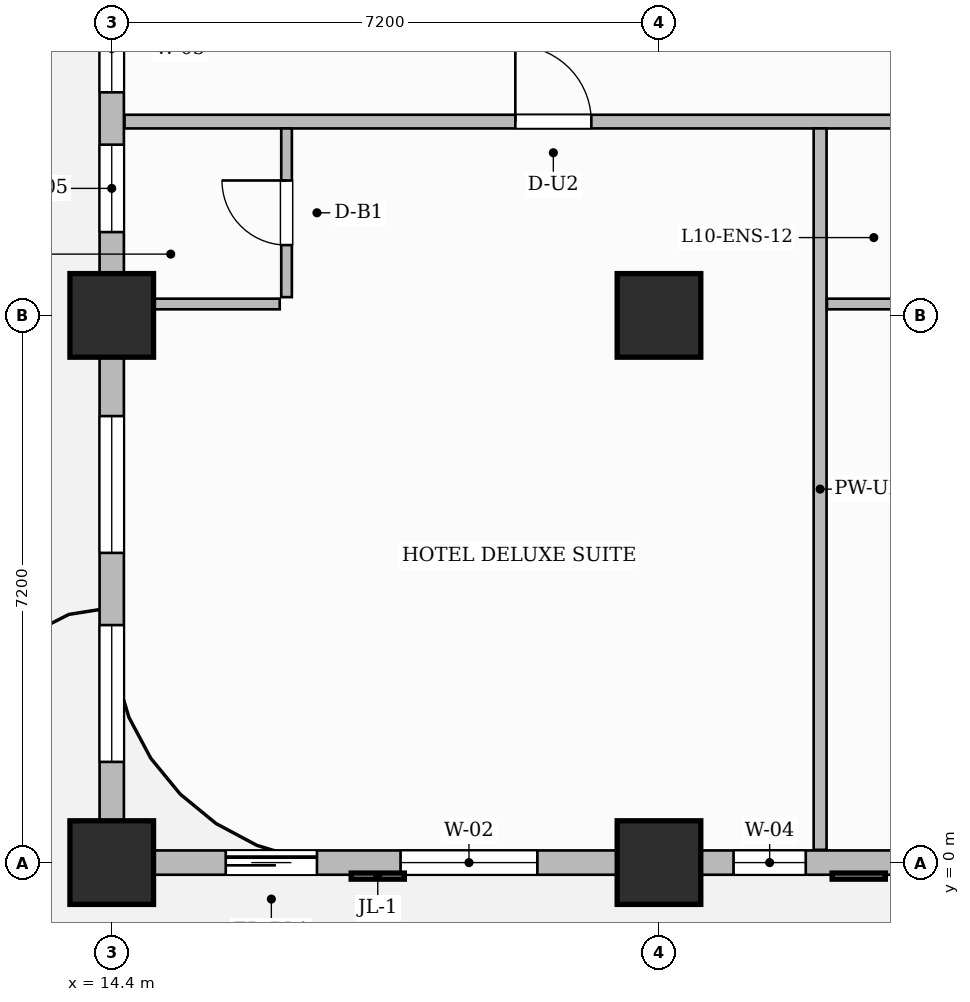
"""IFC4 building model, lengths in metres.
Left out: names, types, materials, properties, quantities, classifications, styles, units other than length and angle.
Written with IfcOpenShell. Run it as: python <this file> out.ifc"""

import sys

from ifc_helpers import new_model, si_unit, direction, frame, frame_2d, origin, origin_2d, place, context, subcontext, project, spatial, rectangle, extrude, source, transform, mapped, element, fill, save


model = new_model("IFC4")
c1 = context("Model", 3, precision=1e-05, world=origin(), true_north=direction((0.0, 1.0)))
c2 = subcontext(c1, "Body", "Model", "MODEL_VIEW")
j1 = project(units=[si_unit("LENGTHUNIT", "METRE"), si_unit("PLANEANGLEUNIT", "RADIAN")], contexts=[c1])
p1 = place(None, origin())
s1 = spatial("IfcSite", under=j1, at=p1, CompositionType="ELEMENT")
p2 = place(p1, origin())
s2 = spatial("IfcBuilding", under=s1, at=p2, CompositionType="ELEMENT")
p3 = place(p2, frame((0.0, 0.0, 47.2)))
s3 = spatial("IfcBuildingStorey", under=s2, at=p3, CompositionType="ELEMENT", Elevation=47.2)
m1 = source(origin(), c2, "Body", "SweptSolid", [
    extrude(rectangle(XDim=1.1, YDim=1.1, at=origin_2d()), origin(), (0.0, 0.0, 1.0), 3.7),
])
for number, where, z_axis, x_axis in (
    (1, (14.4, 0.0, 0.0), (0.0, 0.0, 1.0), (1.0, 0.0, 0.0)),
    (2, (14.4, 7.2, 0.0), (0.0, 0.0, 1.0), (1.0, 0.0, 0.0)),
    (3, (21.6, 0.0, 0.0), (0.0, 0.0, 1.0), (1.0, 0.0, 0.0)),
    (4, (21.6, 7.2, 0.0), (0.0, 0.0, 1.0), (1.0, 0.0, 0.0)),
):
    element("IfcColumn", number, at=place(p3, frame(where, z_axis=z_axis, x_axis=x_axis)), inside=s3, PredefinedType="COLUMN", context=c2, shape_type="MappedRepresentation", body=[
        mapped(m1, transform((0.0, 0.0, 0.0), scale=1.0)),
    ])
p4 = place(p3, frame((14.568, 9.75, 0.0), z_axis=(0.0, 0.0, 1.0), x_axis=(1.0, 0.0, 0.0)))
e5 = element("IfcWall", 5, at=p4, inside=s3, PredefinedType="PARTITIONING", context=c2, shape_type="SweptSolid", body=[
    extrude(rectangle(XDim=15.542, YDim=0.18, at=frame_2d((7.771, 0.0))), origin(), (0.0, 0.0, 1.0), 3.45),
])
p5 = place(p4, frame((5.142, 0.0, 0.0)))
e6 = element("IfcOpeningElement", 6, at=p5, cuts=e5, PredefinedType="OPENING", context=c2, shape_type="SweptSolid", body=[
    extrude(rectangle(XDim=1.0, YDim=2.2, at=frame_2d((0.5, 1.1))), frame((0.0, 0.1, 0.0), z_axis=(0.0, -1.0, 0.0), x_axis=(1.0, 0.0, 0.0)), (0.0, 0.0, 1.0), 0.2),
])
p6 = place(p4, frame((13.017, 0.0, 0.0)))
e7 = element("IfcOpeningElement", 7, at=p6, cuts=e5, PredefinedType="OPENING", context=c2, shape_type="SweptSolid", body=[
    extrude(rectangle(XDim=1.05, YDim=2.25, at=frame_2d((0.525, 1.125))), frame((0.0, 0.1, 0.0), z_axis=(0.0, -1.0, 0.0), x_axis=(1.0, 0.0, 0.0)), (0.0, 0.0, 1.0), 0.2),
])
p7 = place(p3, frame((23.72, 0.168, 0.0), z_axis=(0.0, 0.0, 1.0), x_axis=(0.0, 1.0, 0.0)))
e8 = element("IfcWall", 8, at=p7, inside=s3, PredefinedType="PARTITIONING", context=c2, shape_type="SweptSolid", body=[
    extrude(rectangle(XDim=9.492, YDim=0.17, at=frame_2d((4.746, 0.0))), origin(), (0.0, 0.0, 1.0), 3.45),
])
p8 = place(p3, frame((16.7, 7.44, 0.0), z_axis=(0.0, 0.0, 1.0), x_axis=(0.0, 1.0, 0.0)))
e9 = element("IfcWall", 9, at=p8, inside=s3, PredefinedType="PARTITIONING", context=c2, shape_type="SweptSolid", body=[
    extrude(rectangle(XDim=2.22, YDim=0.14, at=frame_2d((1.11, 0.0))), origin(), (0.0, 0.0, 1.0), 3.45),
])
p9 = place(p8, frame((0.685, 0.0, 0.0)))
e10 = element("IfcOpeningElement", 10, at=p9, cuts=e9, PredefinedType="OPENING", context=c2, shape_type="SweptSolid", body=[
    extrude(rectangle(XDim=0.85, YDim=2.1, at=frame_2d((0.425, 1.05))), frame((0.0, 0.08, 0.0), z_axis=(0.0, -1.0, 0.0), x_axis=(1.0, 0.0, 0.0)), (0.0, 0.0, 1.0), 0.16),
])
p10 = place(p3, frame((14.49, 7.35, 0.0), z_axis=(0.0, 0.0, 1.0), x_axis=(1.0, 0.0, 0.0)))
e11 = element("IfcWall", 11, at=p10, inside=s3, PredefinedType="PARTITIONING", context=c2, shape_type="SweptSolid", body=[
    extrude(rectangle(XDim=2.12, YDim=0.14, at=frame_2d((1.06, 0.0))), origin(), (0.0, 0.0, 1.0), 2.885),
])
p11 = place(p3, frame((23.81, 7.35, 0.0), z_axis=(0.0, 0.0, 1.0), x_axis=(1.0, 0.0, 0.0)))
e12 = element("IfcWall", 12, at=p11, inside=s3, PredefinedType="PARTITIONING", context=c2, shape_type="SweptSolid", body=[
    extrude(rectangle(XDim=2.12, YDim=0.14, at=frame_2d((1.06, 0.0))), origin(), (0.0, 0.0, 1.0), 2.885),
])
p12 = place(p3, frame((14.4, 0.0, 0.0), z_axis=(0.0, 0.0, 1.0), x_axis=(1.0, 0.0, 0.0)))
e13 = element("IfcWall", 13, at=p12, inside=s3, PredefinedType="SOLIDWALL", context=c2, shape_type="SweptSolid", body=[
    extrude(rectangle(XDim=43.2, YDim=0.32, at=frame_2d((21.6, 0.0))), origin(), (0.0, 0.0, 1.0), 2.885),
])
p13 = place(p12, frame((1.5, 0.0, 0.0)))
e14 = element("IfcOpeningElement", 14, at=p13, cuts=e13, PredefinedType="OPENING", context=c2, shape_type="SweptSolid", body=[
    extrude(rectangle(XDim=1.2, YDim=2.2, at=frame_2d((0.6, 1.1))), frame((0.0, 0.17, 0.0), z_axis=(0.0, -1.0, 0.0), x_axis=(1.0, 0.0, 0.0)), (0.0, 0.0, 1.0), 0.34),
])
p14 = place(p12, frame((3.8, 0.0, 0.8)))
e15 = element("IfcOpeningElement", 15, at=p14, cuts=e13, PredefinedType="OPENING", context=c2, shape_type="SweptSolid", body=[
    extrude(rectangle(XDim=1.8, YDim=1.85, at=frame_2d((0.9, 0.925))), frame((0.0, 0.17, 0.0), z_axis=(0.0, -1.0, 0.0), x_axis=(1.0, 0.0, 0.0)), (0.0, 0.0, 1.0), 0.34),
])
p15 = place(p12, frame((8.181, 0.0, 0.8)))
e16 = element("IfcOpeningElement", 16, at=p15, cuts=e13, PredefinedType="OPENING", context=c2, shape_type="SweptSolid", body=[
    extrude(rectangle(XDim=0.95, YDim=1.75, at=frame_2d((0.475, 0.875))), frame((0.0, 0.17, 0.0), z_axis=(0.0, -1.0, 0.0), x_axis=(1.0, 0.0, 0.0)), (0.0, 0.0, 1.0), 0.34),
])
p16 = place(p12, frame((10.564, 0.0, 0.8)))
e17 = element("IfcOpeningElement", 17, at=p16, cuts=e13, PredefinedType="OPENING", context=c2, shape_type="SweptSolid", body=[
    extrude(rectangle(XDim=1.8, YDim=1.85, at=frame_2d((0.9, 0.925))), frame((0.0, 0.17, 0.0), z_axis=(0.0, -1.0, 0.0), x_axis=(1.0, 0.0, 0.0)), (0.0, 0.0, 1.0), 0.34),
])
p17 = place(p12, frame((16.804, 0.0, 0.8)))
e18 = element("IfcOpeningElement", 18, at=p17, cuts=e13, PredefinedType="OPENING", context=c2, shape_type="SweptSolid", body=[
    extrude(rectangle(XDim=1.8, YDim=1.85, at=frame_2d((0.9, 0.925))), frame((0.0, 0.17, 0.0), z_axis=(0.0, -1.0, 0.0), x_axis=(1.0, 0.0, 0.0)), (0.0, 0.0, 1.0), 0.34),
])
p18 = place(p12, frame((22.396, 0.0, 0.8)))
e19 = element("IfcOpeningElement", 19, at=p18, cuts=e13, PredefinedType="OPENING", context=c2, shape_type="SweptSolid", body=[
    extrude(rectangle(XDim=1.8, YDim=1.85, at=frame_2d((0.9, 0.925))), frame((0.0, 0.17, 0.0), z_axis=(0.0, -1.0, 0.0), x_axis=(1.0, 0.0, 0.0)), (0.0, 0.0, 1.0), 0.34),
])
p19 = place(p12, frame((25.629, 0.0, 0.8)))
e20 = element("IfcOpeningElement", 20, at=p19, cuts=e13, PredefinedType="OPENING", context=c2, shape_type="SweptSolid", body=[
    extrude(rectangle(XDim=0.95, YDim=1.75, at=frame_2d((0.475, 0.875))), frame((0.0, 0.17, 0.0), z_axis=(0.0, -1.0, 0.0), x_axis=(1.0, 0.0, 0.0)), (0.0, 0.0, 1.0), 0.34),
])
p20 = place(p12, frame((29.075, 0.0, 0.8)))
e21 = element("IfcOpeningElement", 21, at=p20, cuts=e13, PredefinedType="OPENING", context=c2, shape_type="SweptSolid", body=[
    extrude(rectangle(XDim=1.8, YDim=1.85, at=frame_2d((0.9, 0.925))), frame((0.0, 0.17, 0.0), z_axis=(0.0, -1.0, 0.0), x_axis=(1.0, 0.0, 0.0)), (0.0, 0.0, 1.0), 0.34),
])
p21 = place(p12, frame((32.125, 0.0, 0.8)))
e22 = element("IfcOpeningElement", 22, at=p21, cuts=e13, PredefinedType="OPENING", context=c2, shape_type="SweptSolid", body=[
    extrude(rectangle(XDim=1.8, YDim=1.85, at=frame_2d((0.9, 0.925))), frame((0.0, 0.17, 0.0), z_axis=(0.0, -1.0, 0.0), x_axis=(1.0, 0.0, 0.0)), (0.0, 0.0, 1.0), 0.34),
])
p22 = place(p12, frame((36.946, 0.0, 0.8)))
e23 = element("IfcOpeningElement", 23, at=p22, cuts=e13, PredefinedType="OPENING", context=c2, shape_type="SweptSolid", body=[
    extrude(rectangle(XDim=1.8, YDim=1.85, at=frame_2d((0.9, 0.925))), frame((0.0, 0.17, 0.0), z_axis=(0.0, -1.0, 0.0), x_axis=(1.0, 0.0, 0.0)), (0.0, 0.0, 1.0), 0.34),
])
p23 = place(p12, frame((40.054, 0.0, 0.8)))
e24 = element("IfcOpeningElement", 24, at=p23, cuts=e13, PredefinedType="OPENING", context=c2, shape_type="SweptSolid", body=[
    extrude(rectangle(XDim=1.8, YDim=1.85, at=frame_2d((0.9, 0.925))), frame((0.0, 0.17, 0.0), z_axis=(0.0, -1.0, 0.0), x_axis=(1.0, 0.0, 0.0)), (0.0, 0.0, 1.0), 0.34),
])
p24 = place(p3, frame((14.4, 0.05, 0.0), z_axis=(0.0, 0.0, 1.0), x_axis=(0.0, 1.0, 0.0)))
e25 = element("IfcWall", 25, at=p24, inside=s3, PredefinedType="SOLIDWALL", context=c2, shape_type="SweptSolid", body=[
    extrude(rectangle(XDim=21.5, YDim=0.32, at=frame_2d((10.75, 0.0))), origin(), (0.0, 0.0, 1.0), 2.885),
])
p25 = place(p24, frame((1.275, 0.0, 0.8)))
e26 = element("IfcOpeningElement", 26, at=p25, cuts=e25, PredefinedType="OPENING", context=c2, shape_type="SweptSolid", body=[
    extrude(rectangle(XDim=1.8, YDim=1.85, at=frame_2d((0.9, 0.925))), frame((0.0, 0.17, 0.0), z_axis=(0.0, -1.0, 0.0), x_axis=(1.0, 0.0, 0.0)), (0.0, 0.0, 1.0), 0.34),
])
p26 = place(p24, frame((4.025, 0.0, 0.8)))
e27 = element("IfcOpeningElement", 27, at=p26, cuts=e25, PredefinedType="OPENING", context=c2, shape_type="SweptSolid", body=[
    extrude(rectangle(XDim=1.8, YDim=1.85, at=frame_2d((0.9, 0.925))), frame((0.0, 0.17, 0.0), z_axis=(0.0, -1.0, 0.0), x_axis=(1.0, 0.0, 0.0)), (0.0, 0.0, 1.0), 0.34),
])
p27 = place(p24, frame((8.246, 0.0, 0.8)))
e28 = element("IfcOpeningElement", 28, at=p27, cuts=e25, PredefinedType="OPENING", context=c2, shape_type="SweptSolid", body=[
    extrude(rectangle(XDim=1.15, YDim=1.8, at=frame_2d((0.575, 0.9))), frame((0.0, 0.17, 0.0), z_axis=(0.0, -1.0, 0.0), x_axis=(1.0, 0.0, 0.0)), (0.0, 0.0, 1.0), 0.34),
])
p28 = place(p24, frame((10.085, 0.0, 0.8)))
e29 = element("IfcOpeningElement", 29, at=p28, cuts=e25, PredefinedType="OPENING", context=c2, shape_type="SweptSolid", body=[
    extrude(rectangle(XDim=1.15, YDim=1.8, at=frame_2d((0.575, 0.9))), frame((0.0, 0.17, 0.0), z_axis=(0.0, -1.0, 0.0), x_axis=(1.0, 0.0, 0.0)), (0.0, 0.0, 1.0), 0.34),
])
p29 = place(p24, frame((12.014, 0.0, 0.8)))
e30 = element("IfcOpeningElement", 30, at=p29, cuts=e25, PredefinedType="OPENING", context=c2, shape_type="SweptSolid", body=[
    extrude(rectangle(XDim=1.15, YDim=1.8, at=frame_2d((0.575, 0.9))), frame((0.0, 0.17, 0.0), z_axis=(0.0, -1.0, 0.0), x_axis=(1.0, 0.0, 0.0)), (0.0, 0.0, 1.0), 0.34),
])
p30 = place(p24, frame((15.406, 0.0, 0.8)))
e31 = element("IfcOpeningElement", 31, at=p30, cuts=e25, PredefinedType="OPENING", context=c2, shape_type="SweptSolid", body=[
    extrude(rectangle(XDim=0.95, YDim=1.75, at=frame_2d((0.475, 0.875))), frame((0.0, 0.17, 0.0), z_axis=(0.0, -1.0, 0.0), x_axis=(1.0, 0.0, 0.0)), (0.0, 0.0, 1.0), 0.34),
])
p31 = place(p24, frame((17.789, 0.0, 0.8)))
e32 = element("IfcOpeningElement", 32, at=p31, cuts=e25, PredefinedType="OPENING", context=c2, shape_type="SweptSolid", body=[
    extrude(rectangle(XDim=1.8, YDim=1.85, at=frame_2d((0.9, 0.925))), frame((0.0, 0.17, 0.0), z_axis=(0.0, -1.0, 0.0), x_axis=(1.0, 0.0, 0.0)), (0.0, 0.0, 1.0), 0.34),
])
m2 = source(origin(), c2, "Body", "SweptSolid", [
    extrude(rectangle(XDim=0.85, YDim=2.1, at=frame_2d((0.425, 1.05))), frame((0.0, 0.025, 0.0), z_axis=(0.0, -1.0, 0.0), x_axis=(1.0, 0.0, 0.0)), (0.0, 0.0, 1.0), 0.05),
])
p32 = place(p9, origin())
e33 = element("IfcDoor", 33, at=p32, inside=s3, OperationType="SINGLE_SWING_RIGHT", PredefinedType="DOOR", context=c2, shape_type="MappedRepresentation", body=[
    mapped(m2, transform((0.0, 0.0, 0.0), scale=1.0)),
])
fill(e10, e33)
m3 = source(origin(), c2, "Body", "SweptSolid", [
    extrude(rectangle(XDim=1.0, YDim=2.2, at=frame_2d((0.5, 1.1))), frame((0.0, 0.025, 0.0), z_axis=(0.0, -1.0, 0.0), x_axis=(1.0, 0.0, 0.0)), (0.0, 0.0, 1.0), 0.05),
])
p33 = place(p5, origin())
e34 = element("IfcDoor", 34, at=p33, inside=s3, OperationType="SINGLE_SWING_LEFT", PredefinedType="DOOR", context=c2, shape_type="MappedRepresentation", body=[
    mapped(m3, transform((0.0, 0.0, 0.0), scale=1.0)),
])
fill(e6, e34)
m4 = source(origin(), c2, "Body", "SweptSolid", [
    extrude(rectangle(XDim=1.2, YDim=2.2, at=frame_2d((0.6, 1.1))), frame((0.0, 0.025, 0.0), z_axis=(0.0, -1.0, 0.0), x_axis=(1.0, 0.0, 0.0)), (0.0, 0.0, 1.0), 0.05),
])
p34 = place(p13, origin())
e35 = element("IfcDoor", 35, at=p34, inside=s3, OperationType="SLIDING_TO_LEFT", PredefinedType="DOOR", context=c2, shape_type="MappedRepresentation", body=[
    mapped(m4, transform((0.0, 0.0, 0.0), scale=1.0)),
])
fill(e14, e35)
m5 = source(origin(), c2, "Body", "SweptSolid", [
    extrude(rectangle(XDim=1.8, YDim=1.85, at=frame_2d((0.9, 0.925))), frame((0.0, 0.03, 0.0), z_axis=(0.0, -1.0, 0.0), x_axis=(1.0, 0.0, 0.0)), (0.0, 0.0, 1.0), 0.06),
])
p35 = place(p14, origin())
e36 = element("IfcWindow", 36, at=p35, inside=s3, PartitioningType="DOUBLE_PANEL_VERTICAL", PredefinedType="WINDOW", context=c2, shape_type="MappedRepresentation", body=[
    mapped(m5, transform((0.0, 0.0, 0.0), scale=1.0)),
])
fill(e15, e36)
m6 = source(origin(), c2, "Body", "SweptSolid", [
    extrude(rectangle(XDim=0.95, YDim=1.75, at=frame_2d((0.475, 0.875))), frame((0.0, 0.03, 0.0), z_axis=(0.0, -1.0, 0.0), x_axis=(1.0, 0.0, 0.0)), (0.0, 0.0, 1.0), 0.06),
])
p36 = place(p15, origin())
e37 = element("IfcWindow", 37, at=p36, inside=s3, PartitioningType="SINGLE_PANEL", PredefinedType="WINDOW", context=c2, shape_type="MappedRepresentation", body=[
    mapped(m6, transform((0.0, 0.0, 0.0), scale=1.0)),
])
fill(e16, e37)
p37 = place(p25, origin())
e38 = element("IfcWindow", 38, at=p37, inside=s3, PartitioningType="DOUBLE_PANEL_VERTICAL", PredefinedType="WINDOW", context=c2, shape_type="MappedRepresentation", body=[
    mapped(m5, transform((0.0, 0.0, 0.0), scale=1.0)),
])
fill(e26, e38)
p38 = place(p26, origin())
e39 = element("IfcWindow", 39, at=p38, inside=s3, PartitioningType="DOUBLE_PANEL_VERTICAL", PredefinedType="WINDOW", context=c2, shape_type="MappedRepresentation", body=[
    mapped(m5, transform((0.0, 0.0, 0.0), scale=1.0)),
])
fill(e27, e39)
m7 = source(origin(), c2, "Body", "SweptSolid", [
    extrude(rectangle(XDim=1.15, YDim=1.8, at=frame_2d((0.575, 0.9))), frame((0.0, 0.03, 0.0), z_axis=(0.0, -1.0, 0.0), x_axis=(1.0, 0.0, 0.0)), (0.0, 0.0, 1.0), 0.06),
])
p39 = place(p27, origin())
e40 = element("IfcWindow", 40, at=p39, inside=s3, PartitioningType="SINGLE_PANEL", PredefinedType="WINDOW", context=c2, shape_type="MappedRepresentation", body=[
    mapped(m7, transform((0.0, 0.0, 0.0), scale=1.0)),
])
fill(e28, e40)
p40 = place(p28, origin())
e41 = element("IfcWindow", 41, at=p40, inside=s3, PartitioningType="SINGLE_PANEL", PredefinedType="WINDOW", context=c2, shape_type="MappedRepresentation", body=[
    mapped(m7, transform((0.0, 0.0, 0.0), scale=1.0)),
])
fill(e29, e41)
save(model, sys.argv[1])
